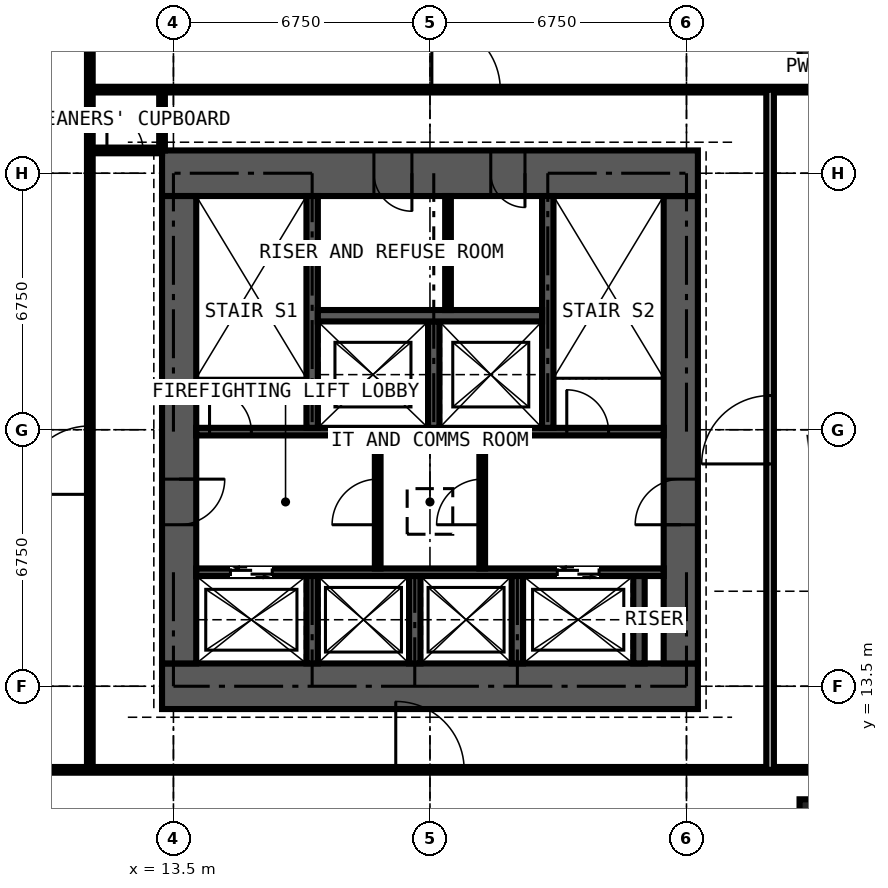
"""IFC4 building model, lengths in metres.
Left out: names, types, materials, properties, quantities, classifications, styles, units other than length and angle.
Written with IfcOpenShell. Run it as: python <this file> out.ifc"""

import sys

from ifc_helpers import new_model, si_unit, direction, frame, frame_2d, origin, origin_2d, place, context, subcontext, project, spatial, rectangle, extrude, element, fill, save


model = new_model("IFC4")
c1 = context("Model", 3, precision=1e-05, world=origin(), true_north=direction((0.0, 1.0)))
c2 = subcontext(c1, "Body", "Model", "MODEL_VIEW")
j1 = project(units=[si_unit("LENGTHUNIT", "METRE"), si_unit("PLANEANGLEUNIT", "RADIAN")], contexts=[c1])
p1 = place(None, origin())
s1 = spatial("IfcSite", under=j1, at=p1, CompositionType="ELEMENT")
p2 = place(p1, origin())
s2 = spatial("IfcBuilding", under=s1, at=p2, CompositionType="ELEMENT")
p3 = place(p2, frame((0.0, 0.0, 254.7)))
s3 = spatial("IfcBuildingStorey", under=s2, at=p3, CompositionType="ELEMENT", Elevation=254.7)
for number, where, z_axis, x_axis in (
    (1, (30.375, 10.125, 0.0), (0.0, 0.0, 1.0), (1.0, 0.0, 0.0)),
    (2, (30.375, 30.375, 0.0), (0.0, 0.0, 1.0), (1.0, 0.0, 0.0)),
):
    element("IfcColumn", number, at=place(p3, frame(where, z_axis=z_axis, x_axis=x_axis)), inside=s3, PredefinedType="COLUMN", context=c2, shape_type="SweptSolid", body=[
        extrude(rectangle(XDim=0.8, YDim=0.8, at=origin_2d()), origin(), (0.0, 0.0, 1.0), 4.5),
    ])
p4 = place(p3, frame((13.2, 13.5, 0.0), z_axis=(0.0, 0.0, 1.0), x_axis=(1.0, 0.0, 0.0)))
e3 = element("IfcWall", 3, at=p4, inside=s3, PredefinedType="SHEAR", context=c2, shape_type="SweptSolid", body=[
    extrude(rectangle(XDim=14.1, YDim=1.2, at=frame_2d((7.05, 0.0))), origin(), (0.0, 0.0, 1.0), 4.5),
])
p5 = place(p3, frame((26.85, 14.1, 0.0), z_axis=(0.0, 0.0, 1.0), x_axis=(0.0, 1.0, 0.0)))
e4 = element("IfcWall", 4, at=p5, inside=s3, PredefinedType="SHEAR", context=c2, shape_type="SweptSolid", body=[
    extrude(rectangle(XDim=12.3, YDim=0.9, at=frame_2d((6.15, 0.0))), origin(), (0.0, 0.0, 1.0), 4.5),
])
p6 = place(p5, frame((3.65, 0.0, 0.0)))
e5 = element("IfcOpeningElement", 5, at=p6, cuts=e4, PredefinedType="OPENING", context=c2, shape_type="SweptSolid", body=[
    extrude(rectangle(XDim=1.2, YDim=2.2, at=frame_2d((0.6, 1.1))), frame((0.0, 0.46, 0.0), z_axis=(0.0, -1.0, 0.0), x_axis=(1.0, 0.0, 0.0)), (0.0, 0.0, 1.0), 0.92),
])
p7 = place(p3, frame((27.3, 27.0, 0.0), z_axis=(0.0, 0.0, 1.0), x_axis=(-1.0, 0.0, 0.0)))
e6 = element("IfcWall", 6, at=p7, inside=s3, PredefinedType="SHEAR", context=c2, shape_type="SweptSolid", body=[
    extrude(rectangle(XDim=14.1, YDim=1.2, at=frame_2d((7.05, 0.0))), origin(), (0.0, 0.0, 1.0), 4.5),
])
p8 = place(p7, frame((4.55, 0.0, 0.0)))
e7 = element("IfcOpeningElement", 7, at=p8, cuts=e6, PredefinedType="OPENING", context=c2, shape_type="SweptSolid", body=[
    extrude(rectangle(XDim=0.9, YDim=2.2, at=frame_2d((0.45, 1.1))), frame((0.0, 0.61, 0.0), z_axis=(0.0, -1.0, 0.0), x_axis=(1.0, 0.0, 0.0)), (0.0, 0.0, 1.0), 1.22),
])
p9 = place(p7, frame((7.525, 0.0, 0.0)))
e8 = element("IfcOpeningElement", 8, at=p9, cuts=e6, PredefinedType="OPENING", context=c2, shape_type="SweptSolid", body=[
    extrude(rectangle(XDim=1.0, YDim=2.2, at=frame_2d((0.5, 1.1))), frame((0.0, 0.61, 0.0), z_axis=(0.0, -1.0, 0.0), x_axis=(1.0, 0.0, 0.0)), (0.0, 0.0, 1.0), 1.22),
])
p10 = place(p3, frame((13.65, 26.4, 0.0), z_axis=(0.0, 0.0, 1.0), x_axis=(0.0, -1.0, 0.0)))
e9 = element("IfcWall", 9, at=p10, inside=s3, PredefinedType="SHEAR", context=c2, shape_type="SweptSolid", body=[
    extrude(rectangle(XDim=12.3, YDim=0.9, at=frame_2d((6.15, 0.0))), origin(), (0.0, 0.0, 1.0), 4.5),
])
p11 = place(p10, frame((7.45, 0.0, 0.0)))
e10 = element("IfcOpeningElement", 10, at=p11, cuts=e9, PredefinedType="OPENING", context=c2, shape_type="SweptSolid", body=[
    extrude(rectangle(XDim=1.2, YDim=2.2, at=frame_2d((0.6, 1.1))), frame((0.0, 0.46, 0.0), z_axis=(0.0, -1.0, 0.0), x_axis=(1.0, 0.0, 0.0)), (0.0, 0.0, 1.0), 0.92),
])
p12 = place(p3, frame((14.1, 16.5, 0.0), z_axis=(0.0, 0.0, 1.0), x_axis=(1.0, 0.0, 0.0)))
e11 = element("IfcWall", 11, at=p12, inside=s3, PredefinedType="SHEAR", context=c2, shape_type="SweptSolid", body=[
    extrude(rectangle(XDim=12.3, YDim=0.2, at=frame_2d((6.15, 0.0))), origin(), (0.0, 0.0, 1.0), 4.5),
])
p13 = place(p12, frame((0.9, 0.0, 0.0)))
e12 = element("IfcOpeningElement", 12, at=p13, cuts=e11, PredefinedType="OPENING", context=c2, shape_type="SweptSolid", body=[
    extrude(rectangle(XDim=1.1, YDim=2.2, at=frame_2d((0.55, 1.1))), frame((0.0, 0.11, 0.0), z_axis=(0.0, -1.0, 0.0), x_axis=(1.0, 0.0, 0.0)), (0.0, 0.0, 1.0), 0.22),
])
p14 = place(p12, frame((9.5, 0.0, 0.0)))
e13 = element("IfcOpeningElement", 13, at=p14, cuts=e11, PredefinedType="OPENING", context=c2, shape_type="SweptSolid", body=[
    extrude(rectangle(XDim=1.1, YDim=2.2, at=frame_2d((0.55, 1.1))), frame((0.0, 0.11, 0.0), z_axis=(0.0, -1.0, 0.0), x_axis=(1.0, 0.0, 0.0)), (0.0, 0.0, 1.0), 0.22),
])
p15 = place(p3, frame((14.1, 20.2, 0.0), z_axis=(0.0, 0.0, 1.0), x_axis=(1.0, 0.0, 0.0)))
e14 = element("IfcWall", 14, at=p15, inside=s3, PredefinedType="SHEAR", context=c2, shape_type="SweptSolid", body=[
    extrude(rectangle(XDim=12.3, YDim=0.2, at=frame_2d((6.15, 0.0))), origin(), (0.0, 0.0, 1.0), 4.5),
])
p16 = place(p15, frame((0.35, 0.0, 0.0)))
e15 = element("IfcOpeningElement", 15, at=p16, cuts=e14, PredefinedType="OPENING", context=c2, shape_type="SweptSolid", body=[
    extrude(rectangle(XDim=1.1, YDim=2.2, at=frame_2d((0.55, 1.1))), frame((0.0, 0.11, 0.0), z_axis=(0.0, -1.0, 0.0), x_axis=(1.0, 0.0, 0.0)), (0.0, 0.0, 1.0), 0.22),
])
p17 = place(p15, frame((9.75, 0.0, 0.0)))
e16 = element("IfcOpeningElement", 16, at=p17, cuts=e14, PredefinedType="OPENING", context=c2, shape_type="SweptSolid", body=[
    extrude(rectangle(XDim=1.1, YDim=2.2, at=frame_2d((0.55, 1.1))), frame((0.0, 0.11, 0.0), z_axis=(0.0, -1.0, 0.0), x_axis=(1.0, 0.0, 0.0)), (0.0, 0.0, 1.0), 0.22),
])
for number, where, z_axis, x_axis in (
    (17, (17.15, 20.3, 0.0), (0.0, 0.0, 1.0), (0.0, 1.0, 0.0)),
    (18, (23.35, 20.3, 0.0), (0.0, 0.0, 1.0), (0.0, 1.0, 0.0)),
):
    element("IfcWall", number, at=place(p3, frame(where, z_axis=z_axis, x_axis=x_axis)), inside=s3, PredefinedType="SHEAR", context=c2, shape_type="SweptSolid", body=[
        extrude(rectangle(XDim=6.1, YDim=0.3, at=frame_2d((3.05, 0.0))), origin(), (0.0, 0.0, 1.0), 4.5),
    ])
p18 = place(p3, frame((20.35, 20.3, 0.0), z_axis=(0.0, 0.0, 1.0), x_axis=(0.0, 1.0, 0.0)))
e19 = element("IfcWall", 19, at=p18, inside=s3, PredefinedType="SHEAR", context=c2, shape_type="SweptSolid", body=[
    extrude(rectangle(XDim=2.8, YDim=0.3, at=frame_2d((1.4, 0.0))), origin(), (0.0, 0.0, 1.0), 4.5),
])
p19 = place(p3, frame((17.3, 23.25, 0.0), z_axis=(0.0, 0.0, 1.0), x_axis=(1.0, 0.0, 0.0)))
e20 = element("IfcWall", 20, at=p19, inside=s3, PredefinedType="SHEAR", context=c2, shape_type="SweptSolid", body=[
    extrude(rectangle(XDim=5.9, YDim=0.3, at=frame_2d((2.95, 0.0))), origin(), (0.0, 0.0, 1.0), 4.5),
])
for number, where, z_axis, x_axis in (
    (21, (17.15, 14.1, 0.0), (0.0, 0.0, 1.0), (0.0, 1.0, 0.0)),
    (22, (19.85, 14.1, 0.0), (0.0, 0.0, 1.0), (0.0, 1.0, 0.0)),
    (23, (22.55, 14.1, 0.0), (0.0, 0.0, 1.0), (0.0, 1.0, 0.0)),
    (24, (25.75, 14.1, 0.0), (0.0, 0.0, 1.0), (0.0, 1.0, 0.0)),
):
    element("IfcWall", number, at=place(p3, frame(where, z_axis=z_axis, x_axis=x_axis)), inside=s3, PredefinedType="SHEAR", context=c2, shape_type="SweptSolid", body=[
        extrude(rectangle(XDim=2.3, YDim=0.3, at=frame_2d((1.15, 0.0))), origin(), (0.0, 0.0, 1.0), 4.5),
    ])
p20 = place(p3, frame((18.875, 16.6, 0.0), z_axis=(0.0, 0.0, 1.0), x_axis=(0.0, 1.0, 0.0)))
e25 = element("IfcWall", 25, at=p20, inside=s3, PredefinedType="PARTITIONING", context=c2, shape_type="SweptSolid", body=[
    extrude(rectangle(XDim=3.5, YDim=0.15, at=frame_2d((1.75, 0.0))), origin(), (0.0, 0.0, 1.0), 4.15),
])
p21 = place(p20, frame((1.15, 0.0, 0.0)))
e26 = element("IfcOpeningElement", 26, at=p21, cuts=e25, PredefinedType="OPENING", context=c2, shape_type="SweptSolid", body=[
    extrude(rectangle(XDim=1.2, YDim=2.2, at=frame_2d((0.6, 1.1))), frame((0.0, 0.085, 0.0), z_axis=(0.0, -1.0, 0.0), x_axis=(1.0, 0.0, 0.0)), (0.0, 0.0, 1.0), 0.17),
])
p22 = place(p3, frame((21.625, 16.6, 0.0), z_axis=(0.0, 0.0, 1.0), x_axis=(0.0, 1.0, 0.0)))
e27 = element("IfcWall", 27, at=p22, inside=s3, PredefinedType="PARTITIONING", context=c2, shape_type="SweptSolid", body=[
    extrude(rectangle(XDim=3.5, YDim=0.15, at=frame_2d((1.75, 0.0))), origin(), (0.0, 0.0, 1.0), 4.15),
])
p23 = place(p22, frame((1.15, 0.0, 0.0)))
e28 = element("IfcOpeningElement", 28, at=p23, cuts=e27, PredefinedType="OPENING", context=c2, shape_type="SweptSolid", body=[
    extrude(rectangle(XDim=1.2, YDim=2.2, at=frame_2d((0.6, 1.1))), frame((0.0, 0.085, 0.0), z_axis=(0.0, -1.0, 0.0), x_axis=(1.0, 0.0, 0.0)), (0.0, 0.0, 1.0), 0.17),
])
p24 = place(p3, frame((20.725, 23.4, 0.0), z_axis=(0.0, 0.0, 1.0), x_axis=(0.0, 1.0, 0.0)))
e29 = element("IfcWall", 29, at=p24, inside=s3, PredefinedType="PARTITIONING", context=c2, shape_type="SweptSolid", body=[
    extrude(rectangle(XDim=3.0, YDim=0.15, at=frame_2d((1.5, 0.0))), origin(), (0.0, 0.0, 1.0), 4.15),
])
p25 = place(p3, frame((10.125, 11.3, 0.0), z_axis=(0.0, 0.0, 1.0), x_axis=(1.0, 0.0, 0.0)))
e30 = element("IfcWall", 30, at=p25, inside=s3, PredefinedType="PARTITIONING", context=c2, shape_type="SweptSolid", body=[
    extrude(rectangle(XDim=20.25, YDim=0.15, at=frame_2d((10.125, 0.0))), origin(), (0.0, 0.0, 1.0), 4.15),
])
p26 = place(p25, frame((9.225, 0.0, 0.0)))
e31 = element("IfcOpeningElement", 31, at=p26, cuts=e30, PredefinedType="OPENING", context=c2, shape_type="SweptSolid", body=[
    extrude(rectangle(XDim=1.8, YDim=2.4, at=frame_2d((0.9, 1.2))), frame((0.0, 0.085, 0.0), z_axis=(0.0, -1.0, 0.0), x_axis=(1.0, 0.0, 0.0)), (0.0, 0.0, 1.0), 0.17),
])
p27 = place(p3, frame((11.3, 11.3, 0.0), z_axis=(0.0, 0.0, 1.0), x_axis=(0.0, 1.0, 0.0)))
e32 = element("IfcWall", 32, at=p27, inside=s3, PredefinedType="PARTITIONING", context=c2, shape_type="SweptSolid", body=[
    extrude(rectangle(XDim=19.075, YDim=0.15, at=frame_2d((9.538, 0.0))), origin(), (0.0, 0.0, 1.0), 4.15),
])
p28 = place(p27, frame((7.25, 0.0, 0.0)))
e33 = element("IfcOpeningElement", 33, at=p28, cuts=e32, PredefinedType="OPENING", context=c2, shape_type="SweptSolid", body=[
    extrude(rectangle(XDim=1.8, YDim=2.4, at=frame_2d((0.9, 1.2))), frame((0.0, 0.085, 0.0), z_axis=(0.0, -1.0, 0.0), x_axis=(1.0, 0.0, 0.0)), (0.0, 0.0, 1.0), 0.17),
])
p29 = place(p3, frame((11.3, 27.6, 0.0), z_axis=(0.0, 0.0, 1.0), x_axis=(1.0, 0.0, 0.0)))
e34 = element("IfcWall", 34, at=p29, inside=s3, PredefinedType="PARTITIONING", context=c2, shape_type="SweptSolid", body=[
    extrude(rectangle(XDim=1.9, YDim=0.15, at=frame_2d((0.95, 0.0))), origin(), (0.0, 0.0, 1.0), 3.652),
])
p30 = place(p29, frame((0.45, 0.0, 0.0)))
e35 = element("IfcOpeningElement", 35, at=p30, cuts=e34, PredefinedType="OPENING", context=c2, shape_type="SweptSolid", body=[
    extrude(rectangle(XDim=0.95, YDim=2.2, at=frame_2d((0.475, 1.1))), frame((0.0, 0.085, 0.0), z_axis=(0.0, -1.0, 0.0), x_axis=(1.0, 0.0, 0.0)), (0.0, 0.0, 1.0), 0.17),
])
p31 = place(p3, frame((11.3, 29.2, 0.0), z_axis=(0.0, 0.0, 1.0), x_axis=(1.0, 0.0, 0.0)))
e36 = element("IfcWall", 36, at=p31, inside=s3, PredefinedType="PARTITIONING", context=c2, shape_type="SweptSolid", body=[
    extrude(rectangle(XDim=19.075, YDim=0.15, at=frame_2d((9.538, 0.0))), origin(), (0.0, 0.0, 1.0), 4.15),
])
p32 = place(p31, frame((9.0, 0.0, 0.0)))
e37 = element("IfcOpeningElement", 37, at=p32, cuts=e36, PredefinedType="OPENING", context=c2, shape_type="SweptSolid", body=[
    extrude(rectangle(XDim=1.8, YDim=2.4, at=frame_2d((0.9, 1.2))), frame((0.0, 0.085, 0.0), z_axis=(0.0, -1.0, 0.0), x_axis=(1.0, 0.0, 0.0)), (0.0, 0.0, 1.0), 0.17),
])
p33 = place(p3, frame((13.2, 27.6, 0.0), z_axis=(0.0, 0.0, 1.0), x_axis=(0.0, 1.0, 0.0)))
e38 = element("IfcWall", 38, at=p33, inside=s3, PredefinedType="PARTITIONING", context=c2, shape_type="SweptSolid", body=[
    extrude(rectangle(XDim=1.6, YDim=0.15, at=frame_2d((0.8, 0.0))), origin(), (0.0, 0.0, 1.0), 4.15),
])
p34 = place(p3, frame((29.2, 11.3, 0.0), z_axis=(0.0, 0.0, 1.0), x_axis=(0.0, 1.0, 0.0)))
e39 = element("IfcWall", 39, at=p34, inside=s3, PredefinedType="PARTITIONING", context=c2, shape_type="SweptSolid", body=[
    extrude(rectangle(XDim=17.9, YDim=0.2, at=frame_2d((8.95, 0.0))), origin(), (0.0, 0.0, 1.0), 4.15),
])
p35 = place(p34, frame((8.05, 0.0, 0.0)))
e40 = element("IfcOpeningElement", 40, at=p35, cuts=e39, PredefinedType="OPENING", context=c2, shape_type="SweptSolid", body=[
    extrude(rectangle(XDim=1.8, YDim=2.4, at=frame_2d((0.9, 1.2))), frame((0.0, 0.11, 0.0), z_axis=(0.0, -1.0, 0.0), x_axis=(1.0, 0.0, 0.0)), (0.0, 0.0, 1.0), 0.22),
])
p36 = place(p3, frame((0.0, 0.0, 4.15)))
p37 = place(p36, frame((20.25, 18.1, 0.0)))
p38 = place(p37, frame((0.0, 0.0, 0.3)))
e41 = element("IfcWindow", 41, at=p38, inside=s3, PartitioningType="SINGLE_PANEL", PredefinedType="SKYLIGHT", context=c2, shape_type="SweptSolid", body=[
    extrude(rectangle(XDim=1.2, YDim=1.2, at=origin_2d()), origin(), (0.0, 0.0, 1.0), 0.05),
])
p39 = place(p13, origin())
e42 = element("IfcDoor", 42, at=p39, inside=s3, OperationType="DOUBLE_DOOR_SLIDING", PredefinedType="DOOR", context=c2, shape_type="SweptSolid", body=[
    extrude(rectangle(XDim=1.1, YDim=2.2, at=frame_2d((0.55, 1.1))), frame((0.0, 0.025, 0.0), z_axis=(0.0, -1.0, 0.0), x_axis=(1.0, 0.0, 0.0)), (0.0, 0.0, 1.0), 0.05),
])
fill(e12, e42)
p40 = place(p14, origin())
e43 = element("IfcDoor", 43, at=p40, inside=s3, OperationType="DOUBLE_DOOR_SLIDING", PredefinedType="DOOR", context=c2, shape_type="SweptSolid", body=[
    extrude(rectangle(XDim=1.1, YDim=2.2, at=frame_2d((0.55, 1.1))), frame((0.0, 0.025, 0.0), z_axis=(0.0, -1.0, 0.0), x_axis=(1.0, 0.0, 0.0)), (0.0, 0.0, 1.0), 0.05),
])
fill(e13, e43)
p41 = place(p11, origin())
e44 = element("IfcDoor", 44, at=p41, inside=s3, OperationType="DOUBLE_DOOR_SINGLE_SWING", PredefinedType="DOOR", context=c2, shape_type="SweptSolid", body=[
    extrude(rectangle(XDim=1.2, YDim=2.2, at=frame_2d((0.6, 1.1))), frame((0.0, 0.025, 0.0), z_axis=(0.0, -1.0, 0.0), x_axis=(1.0, 0.0, 0.0)), (0.0, 0.0, 1.0), 0.05),
])
fill(e10, e44)
p42 = place(p6, origin())
e45 = element("IfcDoor", 45, at=p42, inside=s3, OperationType="DOUBLE_DOOR_SINGLE_SWING", PredefinedType="DOOR", context=c2, shape_type="SweptSolid", body=[
    extrude(rectangle(XDim=1.2, YDim=2.2, at=frame_2d((0.6, 1.1))), frame((0.0, 0.025, 0.0), z_axis=(0.0, -1.0, 0.0), x_axis=(1.0, 0.0, 0.0)), (0.0, 0.0, 1.0), 0.05),
])
fill(e5, e45)
p43 = place(p21, origin())
e46 = element("IfcDoor", 46, at=p43, inside=s3, OperationType="DOUBLE_DOOR_SINGLE_SWING", PredefinedType="DOOR", context=c2, shape_type="SweptSolid", body=[
    extrude(rectangle(XDim=1.2, YDim=2.2, at=frame_2d((0.6, 1.1))), frame((0.0, 0.025, 0.0), z_axis=(0.0, -1.0, 0.0), x_axis=(1.0, 0.0, 0.0)), (0.0, 0.0, 1.0), 0.05),
])
fill(e26, e46)
p44 = place(p23, origin())
e47 = element("IfcDoor", 47, at=p44, inside=s3, OperationType="DOUBLE_DOOR_SINGLE_SWING", PredefinedType="DOOR", context=c2, shape_type="SweptSolid", body=[
    extrude(rectangle(XDim=1.2, YDim=2.2, at=frame_2d((0.6, 1.1))), frame((0.0, 0.025, 0.0), z_axis=(0.0, -1.0, 0.0), x_axis=(1.0, 0.0, 0.0)), (0.0, 0.0, 1.0), 0.05),
])
fill(e28, e47)
p45 = place(p8, origin())
e48 = element("IfcDoor", 48, at=p45, inside=s3, OperationType="SINGLE_SWING_LEFT", PredefinedType="DOOR", context=c2, shape_type="SweptSolid", body=[
    extrude(rectangle(XDim=0.9, YDim=2.2, at=frame_2d((0.45, 1.1))), frame((0.0, 0.4, 0.0), z_axis=(0.0, -1.0, 0.0), x_axis=(1.0, 0.0, 0.0)), (0.0, 0.0, 1.0), 0.8),
])
fill(e7, e48)
p46 = place(p9, origin())
e49 = element("IfcDoor", 49, at=p46, inside=s3, OperationType="SINGLE_SWING_LEFT", PredefinedType="DOOR", context=c2, shape_type="SweptSolid", body=[
    extrude(rectangle(XDim=1.0, YDim=2.2, at=frame_2d((0.5, 1.1))), frame((0.0, 0.025, 0.0), z_axis=(0.0, -1.0, 0.0), x_axis=(1.0, 0.0, 0.0)), (0.0, 0.0, 1.0), 0.05),
])
fill(e8, e49)
p47 = place(p16, origin())
e50 = element("IfcDoor", 50, at=p47, inside=s3, OperationType="SINGLE_SWING_LEFT", PredefinedType="DOOR", context=c2, shape_type="SweptSolid", body=[
    extrude(rectangle(XDim=1.1, YDim=2.2, at=frame_2d((0.55, 1.1))), frame((0.0, 0.025, 0.0), z_axis=(0.0, -1.0, 0.0), x_axis=(1.0, 0.0, 0.0)), (0.0, 0.0, 1.0), 0.05),
])
fill(e15, e50)
p48 = place(p17, origin())
e51 = element("IfcDoor", 51, at=p48, inside=s3, OperationType="SINGLE_SWING_LEFT", PredefinedType="DOOR", context=c2, shape_type="SweptSolid", body=[
    extrude(rectangle(XDim=1.1, YDim=2.2, at=frame_2d((0.55, 1.1))), frame((0.0, 0.025, 0.0), z_axis=(0.0, -1.0, 0.0), x_axis=(1.0, 0.0, 0.0)), (0.0, 0.0, 1.0), 0.05),
])
fill(e16, e51)
p49 = place(p30, origin())
e52 = element("IfcDoor", 52, at=p49, inside=s3, OperationType="SINGLE_SWING_LEFT", PredefinedType="DOOR", context=c2, shape_type="SweptSolid", body=[
    extrude(rectangle(XDim=0.95, YDim=2.2, at=frame_2d((0.475, 1.1))), frame((0.0, 0.025, 0.0), z_axis=(0.0, -1.0, 0.0), x_axis=(1.0, 0.0, 0.0)), (0.0, 0.0, 1.0), 0.05),
])
fill(e35, e52)
p50 = place(p26, origin())
e53 = element("IfcDoor", 53, at=p50, inside=s3, OperationType="DOUBLE_DOOR_SINGLE_SWING", PredefinedType="DOOR", context=c2, shape_type="SweptSolid", body=[
    extrude(rectangle(XDim=1.8, YDim=2.4, at=frame_2d((0.9, 1.2))), frame((0.0, 0.025, 0.0), z_axis=(0.0, -1.0, 0.0), x_axis=(1.0, 0.0, 0.0)), (0.0, 0.0, 1.0), 0.05),
])
fill(e31, e53)
p51 = place(p35, origin())
e54 = element("IfcDoor", 54, at=p51, inside=s3, OperationType="DOUBLE_DOOR_SINGLE_SWING", PredefinedType="DOOR", context=c2, shape_type="SweptSolid", body=[
    extrude(rectangle(XDim=1.8, YDim=2.4, at=frame_2d((0.9, 1.2))), frame((0.0, 0.025, 0.0), z_axis=(0.0, -1.0, 0.0), x_axis=(1.0, 0.0, 0.0)), (0.0, 0.0, 1.0), 0.05),
])
fill(e40, e54)
p52 = place(p28, origin())
e55 = element("IfcDoor", 55, at=p52, inside=s3, OperationType="DOUBLE_DOOR_SINGLE_SWING", PredefinedType="DOOR", context=c2, shape_type="SweptSolid", body=[
    extrude(rectangle(XDim=1.8, YDim=2.4, at=frame_2d((0.9, 1.2))), frame((0.0, 0.025, 0.0), z_axis=(0.0, -1.0, 0.0), x_axis=(1.0, 0.0, 0.0)), (0.0, 0.0, 1.0), 0.05),
])
fill(e33, e55)
p53 = place(p32, origin())
e56 = element("IfcDoor", 56, at=p53, inside=s3, OperationType="DOUBLE_DOOR_SINGLE_SWING", PredefinedType="DOOR", context=c2, shape_type="SweptSolid", body=[
    extrude(rectangle(XDim=1.8, YDim=2.4, at=frame_2d((0.9, 1.2))), frame((0.0, 0.025, 0.0), z_axis=(0.0, -1.0, 0.0), x_axis=(1.0, 0.0, 0.0)), (0.0, 0.0, 1.0), 0.05),
])
fill(e37, e56)
save(model, sys.argv[1])
